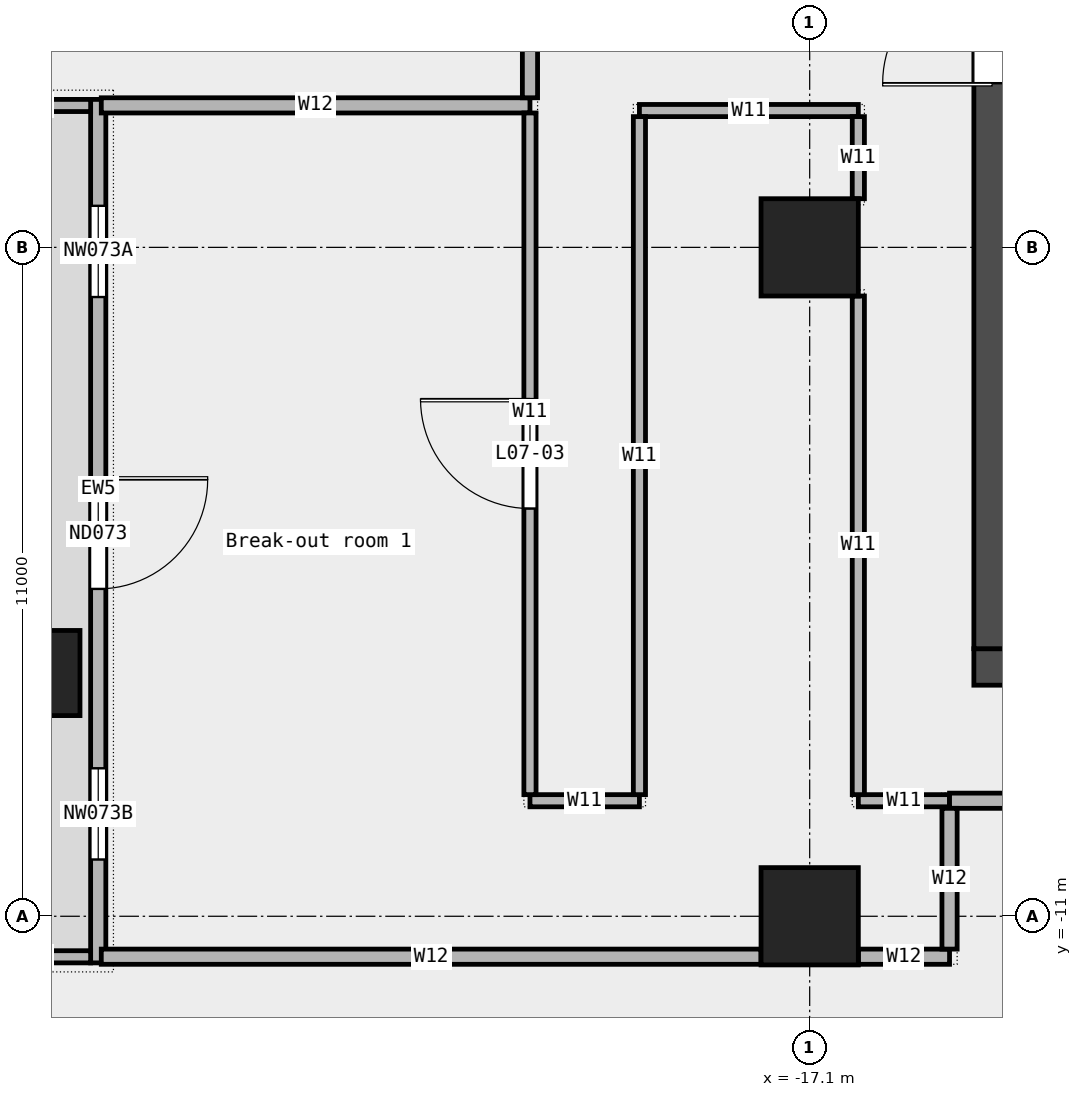
"""IFC4 building model, lengths in metres.
Left out: names, types, materials, properties, quantities, classifications, styles, units other than length and angle.
Written with IfcOpenShell. Run it as: python <this file> out.ifc"""

import sys

from ifc_helpers import new_model, si_unit, direction, frame, frame_2d, origin, origin_2d, place, context, subcontext, project, spatial, rectangle, extrude, element, fill, save


model = new_model("IFC4")
c1 = context("Model", 3, precision=1e-05, world=origin(), true_north=direction((0.0, 1.0)))
c2 = subcontext(c1, "Body", "Model", "MODEL_VIEW")
j1 = project(units=[si_unit("LENGTHUNIT", "METRE"), si_unit("PLANEANGLEUNIT", "RADIAN")], contexts=[c1])
p1 = place(None, origin())
s1 = spatial("IfcSite", under=j1, at=p1, CompositionType="ELEMENT")
p2 = place(p1, origin())
s2 = spatial("IfcBuilding", under=s1, at=p2, CompositionType="ELEMENT")
p3 = place(p2, frame((0.0, 0.0, 40.6)))
s3 = spatial("IfcBuildingStorey", under=s2, at=p3, CompositionType="ELEMENT", Elevation=40.6)
p4 = place(p3, frame((-29.8, -7.0, 0.0), z_axis=(0.0, 0.0, 1.0), x_axis=(1.0, 0.0, 0.0)))
e1 = element("IfcColumn", 1, at=p4, inside=s3, PredefinedType="COLUMN", context=c2, shape_type="SweptSolid", body=[
    extrude(rectangle(XDim=1.4, YDim=1.4, at=origin_2d()), origin(), (0.0, 0.0, 1.0), 4.35),
])
for number, where, z_axis, x_axis in (
    (2, (-17.1, -11.0, 0.0), (0.0, 0.0, 1.0), (1.0, 0.0, 0.0)),
    (3, (-17.1, 0.0, 0.0), (0.0, 0.0, 1.0), (1.0, 0.0, 0.0)),
):
    element("IfcColumn", number, at=place(p3, frame(where, z_axis=z_axis, x_axis=x_axis)), inside=s3, PredefinedType="COLUMN", context=c2, shape_type="SweptSolid", body=[
        extrude(rectangle(XDim=1.6, YDim=1.6, at=origin_2d()), origin(), (0.0, 0.0, 1.0), 4.35),
    ])
p5 = place(p3, frame((-28.8, 2.433, 0.0), z_axis=(0.0, 0.0, 1.0), x_axis=(0.0, -1.0, 0.0)))
e4 = element("IfcWall", 4, at=p5, inside=s3, PredefinedType="STANDARD", context=c2, shape_type="SweptSolid", body=[
    extrude(rectangle(XDim=14.2, YDim=0.25, at=frame_2d((7.1, 0.0))), origin(), (0.0, 0.0, 1.0), 4.35),
])
p6 = place(p5, frame((1.75, 0.0, 0.45)))
e5 = element("IfcOpeningElement", 5, at=p6, cuts=e4, PredefinedType="OPENING", context=c2, shape_type="SweptSolid", body=[
    extrude(rectangle(XDim=1.5, YDim=3.0, at=frame_2d((0.75, 1.5))), frame((0.0, 0.137, 0.0), z_axis=(0.0, -1.0, 0.0), x_axis=(1.0, 0.0, 0.0)), (0.0, 0.0, 1.0), 0.274),
])
p7 = place(p5, frame((6.25, 0.0, 0.0)))
e6 = element("IfcOpeningElement", 6, at=p7, cuts=e4, PredefinedType="OPENING", context=c2, shape_type="SweptSolid", body=[
    extrude(rectangle(XDim=1.8, YDim=2.4, at=frame_2d((0.9, 1.2))), frame((0.0, 0.137, 0.0), z_axis=(0.0, -1.0, 0.0), x_axis=(1.0, 0.0, 0.0)), (0.0, 0.0, 1.0), 0.274),
])
p8 = place(p5, frame((11.0, 0.0, 0.45)))
e7 = element("IfcOpeningElement", 7, at=p8, cuts=e4, PredefinedType="OPENING", context=c2, shape_type="SweptSolid", body=[
    extrude(rectangle(XDim=1.5, YDim=3.0, at=frame_2d((0.75, 1.5))), frame((0.0, 0.137, 0.0), z_axis=(0.0, -1.0, 0.0), x_axis=(1.0, 0.0, 0.0)), (0.0, 0.0, 1.0), 0.274),
])
for number, where, z_axis, x_axis in (
    (8, (-30.8, 2.333, 0.0), (0.0, 0.0, 1.0), (1.0, 0.0, 0.0)),
    (9, (-30.8, -11.667, 0.0), (0.0, 0.0, 1.0), (1.0, 0.0, 0.0)),
):
    element("IfcWall", number, at=place(p3, frame(where, z_axis=z_axis, x_axis=x_axis)), inside=s3, PredefinedType="STANDARD", context=c2, shape_type="SweptSolid", body=[
        extrude(rectangle(XDim=1.875, YDim=0.2, at=frame_2d((0.938, 0.0))), origin(), (0.0, 0.0, 1.0), 4.35),
    ])
p9 = place(p3, frame((-28.75, -11.665, 0.0), z_axis=(0.0, 0.0, 1.0), x_axis=(1.0, 0.0, 0.0)))
e10 = element("IfcWall", 10, at=p9, inside=s3, PredefinedType="PARTITIONING", context=c2, shape_type="SweptSolid", body=[
    extrude(rectangle(XDim=10.85, YDim=0.25, at=frame_2d((5.425, 0.0))), origin(), (0.0, 0.0, 1.0), 4.35),
])
p10 = place(p3, frame((-16.3, -11.665, 0.0), z_axis=(0.0, 0.0, 1.0), x_axis=(1.0, 0.0, 0.0)))
e11 = element("IfcWall", 11, at=p10, inside=s3, PredefinedType="PARTITIONING", context=c2, shape_type="SweptSolid", body=[
    extrude(rectangle(XDim=1.5, YDim=0.25, at=frame_2d((0.75, 0.0))), origin(), (0.0, 0.0, 1.0), 4.35),
])
p11 = place(p3, frame((-21.7, -9.1, 0.0), z_axis=(0.0, 0.0, 1.0), x_axis=(1.0, 0.0, 0.0)))
e12 = element("IfcWall", 12, at=p11, inside=s3, PredefinedType="PARTITIONING", context=c2, shape_type="SweptSolid", body=[
    extrude(rectangle(XDim=1.8, YDim=0.2, at=frame_2d((0.9, 0.0))), origin(), (0.0, 0.0, 1.0), 4.35),
])
p12 = place(p3, frame((-16.3, -9.1, 0.0), z_axis=(0.0, 0.0, 1.0), x_axis=(1.0, 0.0, 0.0)))
e13 = element("IfcWall", 13, at=p12, inside=s3, PredefinedType="PARTITIONING", context=c2, shape_type="SweptSolid", body=[
    extrude(rectangle(XDim=1.5, YDim=0.2, at=frame_2d((0.75, 0.0))), origin(), (0.0, 0.0, 1.0), 4.35),
])
p13 = place(p3, frame((-14.8, -9.1, 0.0), z_axis=(0.0, 0.0, 1.0), x_axis=(1.0, 0.0, 0.0)))
e14 = element("IfcWall", 14, at=p13, inside=s3, PredefinedType="PARTITIONING", context=c2, shape_type="SweptSolid", body=[
    extrude(rectangle(XDim=29.6, YDim=0.25, at=frame_2d((14.8, 0.0))), origin(), (0.0, 0.0, 1.0), 4.35),
])
p14 = place(p13, frame((22.998, 0.0, 0.0)))
e15 = element("IfcOpeningElement", 15, at=p14, cuts=e14, PredefinedType="OPENING", context=c2, shape_type="SweptSolid", body=[
    extrude(rectangle(XDim=1.8, YDim=2.1, at=frame_2d((0.9, 1.05))), frame((0.0, 0.137, 0.0), z_axis=(0.0, -1.0, 0.0), x_axis=(1.0, 0.0, 0.0)), (0.0, 0.0, 1.0), 0.274),
])
p15 = place(p13, frame((9.998, 0.0, 0.0)))
e16 = element("IfcOpeningElement", 16, at=p15, cuts=e14, PredefinedType="OPENING", context=c2, shape_type="SweptSolid", body=[
    extrude(rectangle(XDim=1.8, YDim=2.1, at=frame_2d((0.9, 1.05))), frame((0.0, 0.137, 0.0), z_axis=(0.0, -1.0, 0.0), x_axis=(1.0, 0.0, 0.0)), (0.0, 0.0, 1.0), 0.274),
])
p16 = place(p3, frame((-19.9, 2.25, 0.0), z_axis=(0.0, 0.0, 1.0), x_axis=(1.0, 0.0, 0.0)))
e17 = element("IfcWall", 17, at=p16, inside=s3, PredefinedType="PARTITIONING", context=c2, shape_type="SweptSolid", body=[
    extrude(rectangle(XDim=3.6, YDim=0.2, at=frame_2d((1.8, 0.0))), origin(), (0.0, 0.0, 1.0), 4.35),
])
p17 = place(p3, frame((-28.75, 2.335, 0.0), z_axis=(0.0, 0.0, 1.0), x_axis=(1.0, 0.0, 0.0)))
e18 = element("IfcWall", 18, at=p17, inside=s3, PredefinedType="PARTITIONING", context=c2, shape_type="SweptSolid", body=[
    extrude(rectangle(XDim=7.05, YDim=0.25, at=frame_2d((3.525, 0.0))), origin(), (0.0, 0.0, 1.0), 4.35),
])
p18 = place(p3, frame((-21.7, -9.0, 0.0), z_axis=(0.0, 0.0, 1.0), x_axis=(0.0, 1.0, 0.0)))
e19 = element("IfcWall", 19, at=p18, inside=s3, PredefinedType="PARTITIONING", context=c2, shape_type="SweptSolid", body=[
    extrude(rectangle(XDim=11.21, YDim=0.2, at=frame_2d((5.605, 0.0))), origin(), (0.0, 0.0, 1.0), 4.35),
])
p19 = place(p18, frame((4.705, 0.0, 0.0)))
e20 = element("IfcOpeningElement", 20, at=p19, cuts=e19, PredefinedType="OPENING", context=c2, shape_type="SweptSolid", body=[
    extrude(rectangle(XDim=1.8, YDim=2.1, at=frame_2d((0.9, 1.05))), frame((0.0, 0.112, 0.0), z_axis=(0.0, -1.0, 0.0), x_axis=(1.0, 0.0, 0.0)), (0.0, 0.0, 1.0), 0.224),
])
p20 = place(p3, frame((-21.7, 2.46, 0.0), z_axis=(0.0, 0.0, 1.0), x_axis=(0.0, 1.0, 0.0)))
e21 = element("IfcWall", 21, at=p20, inside=s3, PredefinedType="PARTITIONING", context=c2, shape_type="SweptSolid", body=[
    extrude(rectangle(XDim=12.79, YDim=0.25, at=frame_2d((6.395, 0.0))), origin(), (0.0, 0.0, 1.0), 4.35),
])
p21 = place(p20, frame((5.495, 0.0, 0.0)))
e22 = element("IfcOpeningElement", 22, at=p21, cuts=e21, PredefinedType="OPENING", context=c2, shape_type="SweptSolid", body=[
    extrude(rectangle(XDim=1.8, YDim=2.1, at=frame_2d((0.9, 1.05))), frame((0.0, 0.137, 0.0), z_axis=(0.0, -1.0, 0.0), x_axis=(1.0, 0.0, 0.0)), (0.0, 0.0, 1.0), 0.274),
])
p22 = place(p3, frame((-19.9, -9.0, 0.0), z_axis=(0.0, 0.0, 1.0), x_axis=(0.0, 1.0, 0.0)))
e23 = element("IfcWall", 23, at=p22, inside=s3, PredefinedType="PARTITIONING", context=c2, shape_type="SweptSolid", body=[
    extrude(rectangle(XDim=11.15, YDim=0.2, at=frame_2d((5.575, 0.0))), origin(), (0.0, 0.0, 1.0), 4.35),
])
p23 = place(p3, frame((-16.3, -9.0, 0.0), z_axis=(0.0, 0.0, 1.0), x_axis=(0.0, 1.0, 0.0)))
e24 = element("IfcWall", 24, at=p23, inside=s3, PredefinedType="PARTITIONING", context=c2, shape_type="SweptSolid", body=[
    extrude(rectangle(XDim=8.2, YDim=0.2, at=frame_2d((4.1, 0.0))), origin(), (0.0, 0.0, 1.0), 4.35),
])
p24 = place(p3, frame((-16.3, 0.8, 0.0), z_axis=(0.0, 0.0, 1.0), x_axis=(0.0, 1.0, 0.0)))
e25 = element("IfcWall", 25, at=p24, inside=s3, PredefinedType="PARTITIONING", context=c2, shape_type="SweptSolid", body=[
    extrude(rectangle(XDim=1.35, YDim=0.2, at=frame_2d((0.675, 0.0))), origin(), (0.0, 0.0, 1.0), 4.35),
])
p25 = place(p3, frame((-14.8, -11.54, 0.0), z_axis=(0.0, 0.0, 1.0), x_axis=(0.0, 1.0, 0.0)))
e26 = element("IfcWall", 26, at=p25, inside=s3, PredefinedType="PARTITIONING", context=c2, shape_type="SweptSolid", body=[
    extrude(rectangle(XDim=2.315, YDim=0.25, at=frame_2d((1.157, 0.0))), origin(), (0.0, 0.0, 1.0), 4.35),
])
p26 = place(p3, frame((-14.4, -6.9, 0.0), z_axis=(0.0, 0.0, 1.0), x_axis=(1.0, 0.0, 0.0)))
e27 = element("IfcWall", 27, at=p26, inside=s3, PredefinedType="SHEAR", context=c2, shape_type="SweptSolid", body=[
    extrude(rectangle(XDim=28.8, YDim=0.6, at=frame_2d((14.4, 0.0))), origin(), (0.0, 0.0, 1.0), 4.5),
])
p27 = place(p26, frame((4.337, 0.0, 0.0)))
e28 = element("IfcOpeningElement", 28, at=p27, cuts=e27, PredefinedType="OPENING", context=c2, shape_type="SweptSolid", body=[
    extrude(rectangle(XDim=1.0, YDim=2.1, at=frame_2d((0.5, 1.05))), frame((0.0, 0.312, 0.0), z_axis=(0.0, -1.0, 0.0), x_axis=(1.0, 0.0, 0.0)), (0.0, 0.0, 1.0), 0.624),
])
p28 = place(p26, frame((6.212, 0.0, 0.0)))
e29 = element("IfcOpeningElement", 29, at=p28, cuts=e27, PredefinedType="OPENING", context=c2, shape_type="SweptSolid", body=[
    extrude(rectangle(XDim=1.0, YDim=2.1, at=frame_2d((0.5, 1.05))), frame((0.0, 0.312, 0.0), z_axis=(0.0, -1.0, 0.0), x_axis=(1.0, 0.0, 0.0)), (0.0, 0.0, 1.0), 0.624),
])
p29 = place(p26, frame((10.8, 0.0, 0.0)))
e30 = element("IfcOpeningElement", 30, at=p29, cuts=e27, PredefinedType="OPENING", context=c2, shape_type="SweptSolid", body=[
    extrude(rectangle(XDim=1.2, YDim=2.1, at=frame_2d((0.6, 1.05))), frame((0.0, 0.312, 0.0), z_axis=(0.0, -1.0, 0.0), x_axis=(1.0, 0.0, 0.0)), (0.0, 0.0, 1.0), 0.624),
])
p30 = place(p26, frame((15.587, 0.0, 0.0)))
e31 = element("IfcOpeningElement", 31, at=p30, cuts=e27, PredefinedType="OPENING", context=c2, shape_type="SweptSolid", body=[
    extrude(rectangle(XDim=1.0, YDim=2.1, at=frame_2d((0.5, 1.05))), frame((0.0, 0.312, 0.0), z_axis=(0.0, -1.0, 0.0), x_axis=(1.0, 0.0, 0.0)), (0.0, 0.0, 1.0), 0.624),
])
p31 = place(p26, frame((18.75, 0.0, 0.0)))
e32 = element("IfcOpeningElement", 32, at=p31, cuts=e27, PredefinedType="OPENING", context=c2, shape_type="SweptSolid", body=[
    extrude(rectangle(XDim=1.8, YDim=2.1, at=frame_2d((0.9, 1.05))), frame((0.0, 0.312, 0.0), z_axis=(0.0, -1.0, 0.0), x_axis=(1.0, 0.0, 0.0)), (0.0, 0.0, 1.0), 0.624),
])
p32 = place(p26, frame((23.087, 0.0, 0.0)))
e33 = element("IfcOpeningElement", 33, at=p32, cuts=e27, PredefinedType="OPENING", context=c2, shape_type="SweptSolid", body=[
    extrude(rectangle(XDim=1.0, YDim=2.1, at=frame_2d((0.5, 1.05))), frame((0.0, 0.312, 0.0), z_axis=(0.0, -1.0, 0.0), x_axis=(1.0, 0.0, 0.0)), (0.0, 0.0, 1.0), 0.624),
])
p33 = place(p3, frame((-14.1, -6.6, 0.0), z_axis=(0.0, 0.0, 1.0), x_axis=(0.0, 1.0, 0.0)))
e34 = element("IfcWall", 34, at=p33, inside=s3, PredefinedType="SHEAR", context=c2, shape_type="SweptSolid", body=[
    extrude(rectangle(XDim=19.5, YDim=0.6, at=frame_2d((9.75, 0.0))), origin(), (0.0, 0.0, 1.0), 4.5),
])
p34 = place(p33, frame((9.3, 0.0, 0.0)))
e35 = element("IfcOpeningElement", 35, at=p34, cuts=e34, PredefinedType="OPENING", context=c2, shape_type="SweptSolid", body=[
    extrude(rectangle(XDim=1.8, YDim=2.1, at=frame_2d((0.9, 1.05))), frame((0.0, 0.312, 0.0), z_axis=(0.0, -1.0, 0.0), x_axis=(1.0, 0.0, 0.0)), (0.0, 0.0, 1.0), 0.624),
])
p35 = place(p6, origin())
e36 = element("IfcWindow", 36, at=p35, inside=s3, PartitioningType="SINGLE_PANEL", PredefinedType="WINDOW", context=c2, shape_type="SweptSolid", body=[
    extrude(rectangle(XDim=1.5, YDim=3.0, at=frame_2d((0.75, 1.5))), frame((0.0, 0.03, 0.0), z_axis=(0.0, -1.0, 0.0), x_axis=(1.0, 0.0, 0.0)), (0.0, 0.0, 1.0), 0.06),
])
fill(e5, e36)
p36 = place(p7, origin())
e37 = element("IfcDoor", 37, at=p36, inside=s3, OperationType="DOUBLE_DOOR_SINGLE_SWING", PredefinedType="DOOR", context=c2, shape_type="SweptSolid", body=[
    extrude(rectangle(XDim=1.8, YDim=2.4, at=frame_2d((0.9, 1.2))), frame((0.0, 0.025, 0.0), z_axis=(0.0, -1.0, 0.0), x_axis=(1.0, 0.0, 0.0)), (0.0, 0.0, 1.0), 0.05),
])
fill(e6, e37)
p37 = place(p8, origin())
e38 = element("IfcWindow", 38, at=p37, inside=s3, PartitioningType="SINGLE_PANEL", PredefinedType="WINDOW", context=c2, shape_type="SweptSolid", body=[
    extrude(rectangle(XDim=1.5, YDim=3.0, at=frame_2d((0.75, 1.5))), frame((0.0, 0.03, 0.0), z_axis=(0.0, -1.0, 0.0), x_axis=(1.0, 0.0, 0.0)), (0.0, 0.0, 1.0), 0.06),
])
fill(e7, e38)
p38 = place(p19, origin())
e39 = element("IfcDoor", 39, at=p38, inside=s3, OperationType="DOUBLE_DOOR_SINGLE_SWING", PredefinedType="DOOR", context=c2, shape_type="SweptSolid", body=[
    extrude(rectangle(XDim=1.8, YDim=2.1, at=frame_2d((0.9, 1.05))), frame((0.0, 0.025, 0.0), z_axis=(0.0, -1.0, 0.0), x_axis=(1.0, 0.0, 0.0)), (0.0, 0.0, 1.0), 0.05),
])
fill(e20, e39)
p39 = place(p34, origin())
e40 = element("IfcDoor", 40, at=p39, inside=s3, OperationType="DOUBLE_DOOR_SINGLE_SWING", PredefinedType="DOOR", context=c2, shape_type="SweptSolid", body=[
    extrude(rectangle(XDim=1.8, YDim=2.1, at=frame_2d((0.9, 1.05))), frame((0.0, 0.025, 0.0), z_axis=(0.0, -1.0, 0.0), x_axis=(1.0, 0.0, 0.0)), (0.0, 0.0, 1.0), 0.05),
])
fill(e35, e40)
save(model, sys.argv[1])
